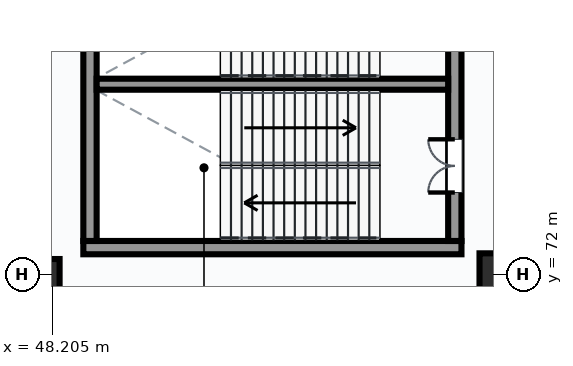
"""IFC4 building model, lengths in metres.
Left out: names, types, materials, properties, quantities, classifications, styles, units other than length and angle.
Written with IfcOpenShell. Run it as: python <this file> out.ifc"""

import sys

from ifc_helpers import new_model, si_unit, direction, frame, frame_2d, origin, origin_2d, place, context, subcontext, project, spatial, rectangle, circle, extrude, element, fill, save


model = new_model("IFC4")
c1 = context("Model", 3, precision=1e-05, world=origin(), true_north=direction((0.0, 1.0)))
c2 = subcontext(c1, "Body", "Model", "MODEL_VIEW")
j1 = project(units=[si_unit("LENGTHUNIT", "METRE"), si_unit("PLANEANGLEUNIT", "RADIAN")], contexts=[c1])
p1 = place(None, origin())
s1 = spatial("IfcSite", under=j1, at=p1, CompositionType="ELEMENT")
p2 = place(p1, origin())
s2 = spatial("IfcBuilding", under=s1, at=p2, CompositionType="ELEMENT")
p3 = place(p2, frame((0.0, 0.0, 5.4)))
s3 = spatial("IfcBuildingStorey", under=s2, at=p3, CompositionType="ELEMENT", Elevation=5.4)
p4 = place(p3, frame((48.0, 72.0, 0.0), z_axis=(0.0, 0.0, 1.0), x_axis=(1.0, 0.0, 0.0)))
e1 = element("IfcColumn", 1, at=p4, inside=s3, PredefinedType="COLUMN", context=c2, shape_type="SweptSolid", body=[
    extrude(circle(Radius=0.4, at=origin_2d()), origin(), (0.0, 0.0, 1.0), 4.8),
])
p5 = place(p3, frame((60.0, 72.0, 0.0), z_axis=(0.0, 0.0, 1.0), x_axis=(1.0, 0.0, 0.0)))
e2 = element("IfcColumn", 2, at=p5, inside=s3, PredefinedType="COLUMN", context=c2, shape_type="SweptSolid", body=[
    extrude(rectangle(XDim=1.1, YDim=1.1, at=origin_2d()), origin(), (0.0, 0.0, 1.0), 4.8),
])
p6 = place(p3, frame((49.025, 72.7, 0.0), z_axis=(0.0, 0.0, 1.0), x_axis=(1.0, 0.0, 0.0)))
e3 = element("IfcWall", 3, at=p6, inside=s3, PredefinedType="SHEAR", context=c2, shape_type="SweptSolid", body=[
    extrude(rectangle(XDim=9.95, YDim=0.35, at=frame_2d((4.975, 0.0))), origin(), (0.0, 0.0, 1.0), 4.8),
])
p7 = place(p3, frame((49.2, 72.875, 0.0), z_axis=(0.0, 0.0, 1.0), x_axis=(0.0, 1.0, 0.0)))
e4 = element("IfcWall", 4, at=p7, inside=s3, PredefinedType="SHEAR", context=c2, shape_type="SweptSolid", body=[
    extrude(rectangle(XDim=8.25, YDim=0.35, at=frame_2d((4.125, 0.0))), origin(), (0.0, 0.0, 1.0), 4.8),
])
p8 = place(p3, frame((58.8, 72.875, 0.0), z_axis=(0.0, 0.0, 1.0), x_axis=(0.0, 1.0, 0.0)))
e5 = element("IfcWall", 5, at=p8, inside=s3, PredefinedType="SHEAR", context=c2, shape_type="SweptSolid", body=[
    extrude(rectangle(XDim=8.25, YDim=0.35, at=frame_2d((4.125, 0.0))), origin(), (0.0, 0.0, 1.0), 4.8),
])
p9 = place(p8, frame((1.275, 0.0, 0.0)))
e6 = element("IfcOpeningElement", 6, at=p9, cuts=e5, PredefinedType="OPENING", context=c2, shape_type="SweptSolid", body=[
    extrude(rectangle(XDim=1.4, YDim=2.2, at=frame_2d((0.7, 1.1))), frame((0.0, 0.185, 0.0), z_axis=(0.0, -1.0, 0.0), x_axis=(1.0, 0.0, 0.0)), (0.0, 0.0, 1.0), 0.37),
])
p10 = place(p8, frame((5.615, 0.0, 0.0)))
e7 = element("IfcOpeningElement", 7, at=p10, cuts=e5, PredefinedType="OPENING", context=c2, shape_type="SweptSolid", body=[
    extrude(rectangle(XDim=1.32, YDim=2.2, at=frame_2d((0.66, 1.1))), frame((0.0, 0.185, 0.0), z_axis=(0.0, -1.0, 0.0), x_axis=(1.0, 0.0, 0.0)), (0.0, 0.0, 1.0), 0.37),
])
p11 = place(p3, frame((49.375, 77.0, 0.0), z_axis=(0.0, 0.0, 1.0), x_axis=(1.0, 0.0, 0.0)))
e8 = element("IfcWall", 8, at=p11, inside=s3, PredefinedType="SHEAR", context=c2, shape_type="SweptSolid", body=[
    extrude(rectangle(XDim=9.25, YDim=0.29, at=frame_2d((4.625, 0.0))), origin(), (0.0, 0.0, 1.0), 4.8),
])
p12 = place(p9, origin())
e9 = element("IfcDoor", 9, at=p12, inside=s3, OperationType="DOUBLE_DOOR_SINGLE_SWING", PredefinedType="DOOR", context=c2, shape_type="SweptSolid", body=[
    extrude(rectangle(XDim=1.4, YDim=2.2, at=frame_2d((0.7, 1.1))), frame((0.0, 0.025, 0.0), z_axis=(0.0, -1.0, 0.0), x_axis=(1.0, 0.0, 0.0)), (0.0, 0.0, 1.0), 0.05),
])
fill(e6, e9)
save(model, sys.argv[1])
